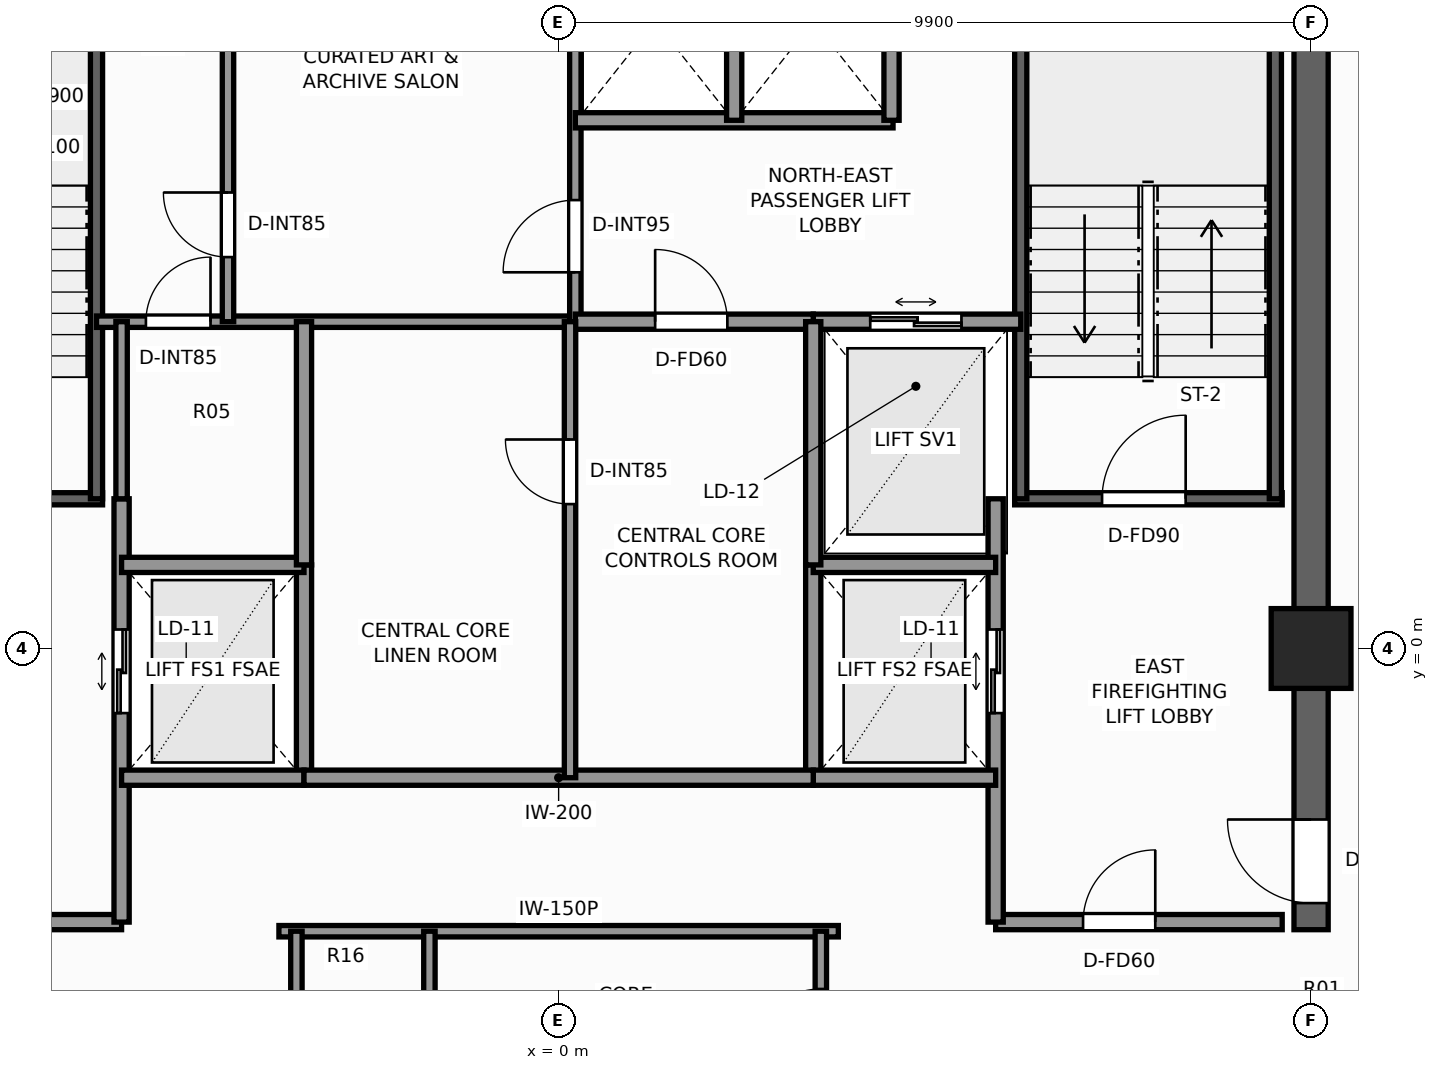
"""IFC4 building model, lengths in metres.
Left out: names, types, materials, properties, quantities, classifications, styles, units other than length and angle.
Written with IfcOpenShell. Run it as: python <this file> out.ifc"""

import sys

from ifc_helpers import new_model, si_unit, direction, frame, frame_2d, origin, origin_2d, place, context, subcontext, project, spatial, rectangle, extrude, element, fill, save


model = new_model("IFC4")
c1 = context("Model", 3, precision=1e-05, world=origin(), true_north=direction((0.0, 1.0)))
c2 = subcontext(c1, "Body", "Model", "MODEL_VIEW")
j1 = project(units=[si_unit("LENGTHUNIT", "METRE"), si_unit("PLANEANGLEUNIT", "RADIAN")], contexts=[c1])
p1 = place(None, origin())
s1 = spatial("IfcSite", under=j1, at=p1, CompositionType="ELEMENT")
p2 = place(p1, origin())
s2 = spatial("IfcBuilding", under=s1, at=p2, CompositionType="ELEMENT")
p3 = place(p2, frame((0.0, 0.0, 244.4)))
s3 = spatial("IfcBuildingStorey", under=s2, at=p3, CompositionType="ELEMENT", Elevation=244.4)
p4 = place(p3, frame((9.9, -3.7, 0.0), z_axis=(0.0, 0.0, 1.0), x_axis=(0.0, 1.0, 0.0)))
e1 = element("IfcWall", 1, at=p4, inside=s3, PredefinedType="SHEAR", context=c2, shape_type="SweptSolid", body=[
    extrude(rectangle(XDim=13.375, YDim=0.45, at=frame_2d((6.688, 0.0))), origin(), (0.0, 0.0, 1.0), 3.5),
])
p5 = place(p4, frame((0.35, 0.0, 0.0)))
e2 = element("IfcOpeningElement", 2, at=p5, cuts=e1, PredefinedType="OPENING", context=c2, shape_type="SweptSolid", body=[
    extrude(rectangle(XDim=1.1, YDim=2.2, at=frame_2d((0.55, 1.1))), frame((0.0, 0.235, 0.0), z_axis=(0.0, -1.0, 0.0), x_axis=(1.0, 0.0, 0.0)), (0.0, 0.0, 1.0), 0.47),
])
p6 = place(p3, frame((9.9, 0.0, 0.0), z_axis=(0.0, 0.0, 1.0), x_axis=(1.0, 0.0, 0.0)))
e3 = element("IfcColumn", 3, at=p6, inside=s3, PredefinedType="COLUMN", context=c2, shape_type="SweptSolid", body=[
    extrude(rectangle(XDim=1.05, YDim=1.05, at=origin_2d()), origin(), (0.0, 0.0, 1.0), 3.5),
])
p7 = place(p3, frame((-9.52, 1.97, 0.0), z_axis=(0.0, 0.0, 1.0), x_axis=(1.0, 0.0, 0.0)))
e4 = element("IfcWall", 4, at=p7, inside=s3, PredefinedType="SHEAR", context=c2, shape_type="SweptSolid", body=[
    extrude(rectangle(XDim=3.52, YDim=0.16, at=frame_2d((1.76, 0.0))), origin(), (0.0, 0.0, 1.0), 3.5),
])
p8 = place(p7, frame((1.15, 0.0, 0.0)))
e5 = element("IfcOpeningElement", 5, at=p8, cuts=e4, PredefinedType="OPENING", context=c2, shape_type="SweptSolid", body=[
    extrude(rectangle(XDim=1.1, YDim=2.2, at=frame_2d((0.55, 1.1))), frame((0.0, 0.09, 0.0), z_axis=(0.0, -1.0, 0.0), x_axis=(1.0, 0.0, 0.0)), (0.0, 0.0, 1.0), 0.18),
])
p9 = place(p3, frame((-6.08, 1.97, 0.0), z_axis=(0.0, 0.0, 1.0), x_axis=(0.0, 1.0, 0.0)))
e6 = element("IfcWall", 6, at=p9, inside=s3, PredefinedType="SHEAR", context=c2, shape_type="SweptSolid", body=[
    extrude(rectangle(XDim=7.56, YDim=0.16, at=frame_2d((3.78, 0.0))), origin(), (0.0, 0.0, 1.0), 3.5),
])
p10 = place(p3, frame((6.0, 1.97, 0.0), z_axis=(0.0, 0.0, 1.0), x_axis=(1.0, 0.0, 0.0)))
e7 = element("IfcWall", 7, at=p10, inside=s3, PredefinedType="SHEAR", context=c2, shape_type="SweptSolid", body=[
    extrude(rectangle(XDim=3.52, YDim=0.16, at=frame_2d((1.76, 0.0))), origin(), (0.0, 0.0, 1.0), 3.5),
])
p11 = place(p10, frame((1.15, 0.0, 0.0)))
e8 = element("IfcOpeningElement", 8, at=p11, cuts=e7, PredefinedType="OPENING", context=c2, shape_type="SweptSolid", body=[
    extrude(rectangle(XDim=1.1, YDim=2.2, at=frame_2d((0.55, 1.1))), frame((0.0, 0.09, 0.0), z_axis=(0.0, -1.0, 0.0), x_axis=(1.0, 0.0, 0.0)), (0.0, 0.0, 1.0), 0.18),
])
for number, where, z_axis, x_axis in (
    (9, (6.08, 1.97, 0.0), (0.0, 0.0, 1.0), (0.0, 1.0, 0.0)),
    (10, (9.43, 1.97, 0.0), (0.0, 0.0, 1.0), (0.0, 1.0, 0.0)),
):
    element("IfcWall", number, at=place(p3, frame(where, z_axis=z_axis, x_axis=x_axis)), inside=s3, PredefinedType="SHEAR", context=c2, shape_type="SweptSolid", body=[
        extrude(rectangle(XDim=7.56, YDim=0.16, at=frame_2d((3.78, 0.0))), origin(), (0.0, 0.0, 1.0), 3.5),
    ])
p12 = place(p3, frame((-9.52, -3.6, 0.0), z_axis=(0.0, 0.0, 1.0), x_axis=(1.0, 0.0, 0.0)))
e11 = element("IfcWall", 11, at=p12, inside=s3, PredefinedType="SOLIDWALL", context=c2, shape_type="SweptSolid", body=[
    extrude(rectangle(XDim=3.77, YDim=0.2, at=frame_2d((1.885, 0.0))), origin(), (0.0, 0.0, 1.0), 3.25),
])
p13 = place(p12, frame((1.15, 0.0, 0.0)))
e12 = element("IfcOpeningElement", 12, at=p13, cuts=e11, PredefinedType="OPENING", context=c2, shape_type="SweptSolid", body=[
    extrude(rectangle(XDim=0.95, YDim=2.06, at=frame_2d((0.475, 1.03))), frame((0.0, 0.11, 0.0), z_axis=(0.0, -1.0, 0.0), x_axis=(1.0, 0.0, 0.0)), (0.0, 0.0, 1.0), 0.22),
])
p14 = place(p3, frame((-5.75, -3.6, 0.0), z_axis=(0.0, 0.0, 1.0), x_axis=(0.0, 1.0, 0.0)))
e13 = element("IfcWall", 13, at=p14, inside=s3, PredefinedType="SOLIDWALL", context=c2, shape_type="SweptSolid", body=[
    extrude(rectangle(XDim=5.57, YDim=0.2, at=frame_2d((2.785, 0.0))), origin(), (0.0, 0.0, 1.0), 3.25),
])
p15 = place(p14, frame((2.75, 0.0, 0.0)))
e14 = element("IfcOpeningElement", 14, at=p15, cuts=e13, PredefinedType="OPENING", context=c2, shape_type="SweptSolid", body=[
    extrude(rectangle(XDim=1.1, YDim=2.2, at=frame_2d((0.55, 1.1))), frame((0.0, 0.11, 0.0), z_axis=(0.0, -1.0, 0.0), x_axis=(1.0, 0.0, 0.0)), (0.0, 0.0, 1.0), 0.22),
])
p16 = place(p3, frame((-3.35, -1.7, 0.0), z_axis=(0.0, 0.0, 1.0), x_axis=(0.0, 1.0, 0.0)))
e15 = element("IfcWall", 15, at=p16, inside=s3, PredefinedType="SOLIDWALL", context=c2, shape_type="SweptSolid", body=[
    extrude(rectangle(XDim=2.8, YDim=0.2, at=frame_2d((1.4, 0.0))), origin(), (0.0, 0.0, 1.0), 3.25),
])
for number, where, z_axis, x_axis in (
    (16, (-5.75, -1.7, 0.0), (0.0, 0.0, 1.0), (1.0, 0.0, 0.0)),
    (17, (-5.75, 1.1, 0.0), (0.0, 0.0, 1.0), (1.0, 0.0, 0.0)),
):
    element("IfcWall", number, at=place(p3, frame(where, z_axis=z_axis, x_axis=x_axis)), inside=s3, PredefinedType="SOLIDWALL", context=c2, shape_type="SweptSolid", body=[
        extrude(rectangle(XDim=2.4, YDim=0.2, at=frame_2d((1.2, 0.0))), origin(), (0.0, 0.0, 1.0), 3.25),
    ])
p17 = place(p3, frame((5.75, -3.6, 0.0), z_axis=(0.0, 0.0, 1.0), x_axis=(1.0, 0.0, 0.0)))
e18 = element("IfcWall", 18, at=p17, inside=s3, PredefinedType="SOLIDWALL", context=c2, shape_type="SweptSolid", body=[
    extrude(rectangle(XDim=3.77, YDim=0.2, at=frame_2d((1.885, 0.0))), origin(), (0.0, 0.0, 1.0), 3.25),
])
p18 = place(p17, frame((1.15, 0.0, 0.0)))
e19 = element("IfcOpeningElement", 19, at=p18, cuts=e18, PredefinedType="OPENING", context=c2, shape_type="SweptSolid", body=[
    extrude(rectangle(XDim=0.95, YDim=2.06, at=frame_2d((0.475, 1.03))), frame((0.0, 0.11, 0.0), z_axis=(0.0, -1.0, 0.0), x_axis=(1.0, 0.0, 0.0)), (0.0, 0.0, 1.0), 0.22),
])
p19 = place(p3, frame((5.75, -3.6, 0.0), z_axis=(0.0, 0.0, 1.0), x_axis=(0.0, 1.0, 0.0)))
e20 = element("IfcWall", 20, at=p19, inside=s3, PredefinedType="SOLIDWALL", context=c2, shape_type="SweptSolid", body=[
    extrude(rectangle(XDim=5.57, YDim=0.2, at=frame_2d((2.785, 0.0))), origin(), (0.0, 0.0, 1.0), 3.25),
])
p20 = place(p19, frame((2.75, 0.0, 0.0)))
e21 = element("IfcOpeningElement", 21, at=p20, cuts=e20, PredefinedType="OPENING", context=c2, shape_type="SweptSolid", body=[
    extrude(rectangle(XDim=1.1, YDim=2.2, at=frame_2d((0.55, 1.1))), frame((0.0, 0.11, 0.0), z_axis=(0.0, -1.0, 0.0), x_axis=(1.0, 0.0, 0.0)), (0.0, 0.0, 1.0), 0.22),
])
p21 = place(p3, frame((3.35, -1.7, 0.0), z_axis=(0.0, 0.0, 1.0), x_axis=(0.0, 1.0, 0.0)))
e22 = element("IfcWall", 22, at=p21, inside=s3, PredefinedType="SOLIDWALL", context=c2, shape_type="SweptSolid", body=[
    extrude(rectangle(XDim=2.8, YDim=0.2, at=frame_2d((1.4, 0.0))), origin(), (0.0, 0.0, 1.0), 3.25),
])
for number, where, z_axis, x_axis in (
    (23, (3.35, -1.7, 0.0), (0.0, 0.0, 1.0), (1.0, 0.0, 0.0)),
    (24, (3.35, 1.1, 0.0), (0.0, 0.0, 1.0), (1.0, 0.0, 0.0)),
):
    element("IfcWall", number, at=place(p3, frame(where, z_axis=z_axis, x_axis=x_axis)), inside=s3, PredefinedType="SOLIDWALL", context=c2, shape_type="SweptSolid", body=[
        extrude(rectangle(XDim=2.4, YDim=0.2, at=frame_2d((1.2, 0.0))), origin(), (0.0, 0.0, 1.0), 3.25),
    ])
p22 = place(p3, frame((3.35, 4.3, 0.0), z_axis=(0.0, 0.0, 1.0), x_axis=(1.0, 0.0, 0.0)))
e25 = element("IfcWall", 25, at=p22, inside=s3, PredefinedType="SOLIDWALL", context=c2, shape_type="SweptSolid", body=[
    extrude(rectangle(XDim=2.73, YDim=0.2, at=frame_2d((1.365, 0.0))), origin(), (0.0, 0.0, 1.0), 3.25),
])
p23 = place(p22, frame((0.75, 0.0, 0.0)))
e26 = element("IfcOpeningElement", 26, at=p23, cuts=e25, PredefinedType="OPENING", context=c2, shape_type="SweptSolid", body=[
    extrude(rectangle(XDim=1.2, YDim=2.25, at=frame_2d((0.6, 1.125))), frame((0.0, 0.11, 0.0), z_axis=(0.0, -1.0, 0.0), x_axis=(1.0, 0.0, 0.0)), (0.0, 0.0, 1.0), 0.22),
])
p24 = place(p3, frame((-6.08, 4.3, 0.0), z_axis=(0.0, 0.0, 1.0), x_axis=(1.0, 0.0, 0.0)))
e27 = element("IfcWall", 27, at=p24, inside=s3, PredefinedType="PARTITIONING", context=c2, shape_type="SweptSolid", body=[
    extrude(rectangle(XDim=6.3, YDim=0.15, at=frame_2d((3.15, 0.0))), origin(), (0.0, 0.0, 1.0), 3.25),
])
p25 = place(p24, frame((0.65, 0.0, 0.0)))
e28 = element("IfcOpeningElement", 28, at=p25, cuts=e27, PredefinedType="OPENING", context=c2, shape_type="SweptSolid", body=[
    extrude(rectangle(XDim=0.85, YDim=2.03, at=frame_2d((0.425, 1.015))), frame((0.0, 0.085, 0.0), z_axis=(0.0, -1.0, 0.0), x_axis=(1.0, 0.0, 0.0)), (0.0, 0.0, 1.0), 0.17),
])
p26 = place(p3, frame((0.22, 4.3, 0.0), z_axis=(0.0, 0.0, 1.0), x_axis=(0.0, 1.0, 0.0)))
e29 = element("IfcWall", 29, at=p26, inside=s3, PredefinedType="PARTITIONING", context=c2, shape_type="SweptSolid", body=[
    extrude(rectangle(XDim=5.22, YDim=0.15, at=frame_2d((2.61, 0.0))), origin(), (0.0, 0.0, 1.0), 3.25),
])
p27 = place(p26, frame((0.65, 0.0, 0.0)))
e30 = element("IfcOpeningElement", 30, at=p27, cuts=e29, PredefinedType="OPENING", context=c2, shape_type="SweptSolid", body=[
    extrude(rectangle(XDim=0.95, YDim=2.06, at=frame_2d((0.475, 1.03))), frame((0.0, 0.085, 0.0), z_axis=(0.0, -1.0, 0.0), x_axis=(1.0, 0.0, 0.0)), (0.0, 0.0, 1.0), 0.17),
])
p28 = place(p3, frame((-4.35, 4.3, 0.0), z_axis=(0.0, 0.0, 1.0), x_axis=(0.0, 1.0, 0.0)))
e31 = element("IfcWall", 31, at=p28, inside=s3, PredefinedType="PARTITIONING", context=c2, shape_type="SweptSolid", body=[
    extrude(rectangle(XDim=5.22, YDim=0.15, at=frame_2d((2.61, 0.0))), origin(), (0.0, 0.0, 1.0), 3.25),
])
p29 = place(p28, frame((0.85, 0.0, 0.0)))
e32 = element("IfcOpeningElement", 32, at=p29, cuts=e31, PredefinedType="OPENING", context=c2, shape_type="SweptSolid", body=[
    extrude(rectangle(XDim=0.85, YDim=2.03, at=frame_2d((0.425, 1.015))), frame((0.0, 0.085, 0.0), z_axis=(0.0, -1.0, 0.0), x_axis=(1.0, 0.0, 0.0)), (0.0, 0.0, 1.0), 0.17),
])
p30 = place(p3, frame((0.22, 6.95, 0.0), z_axis=(0.0, 0.0, 1.0), x_axis=(1.0, 0.0, 0.0)))
e33 = element("IfcWall", 33, at=p30, inside=s3, PredefinedType="SOLIDWALL", context=c2, shape_type="SweptSolid", body=[
    extrude(rectangle(XDim=4.18, YDim=0.2, at=frame_2d((2.09, 0.0))), origin(), (0.0, 0.0, 1.0), 3.25),
])
for number, where, z_axis, x_axis in (
    (34, (4.38, 6.95, 0.0), (0.0, 0.0, 1.0), (0.0, 1.0, 0.0)),
    (35, (2.31, 6.95, 0.0), (0.0, 0.0, 1.0), (0.0, 1.0, 0.0)),
):
    element("IfcWall", number, at=place(p3, frame(where, z_axis=z_axis, x_axis=x_axis)), inside=s3, PredefinedType="SOLIDWALL", context=c2, shape_type="SweptSolid", body=[
        extrude(rectangle(XDim=2.57, YDim=0.2, at=frame_2d((1.285, 0.0))), origin(), (0.0, 0.0, 1.0), 3.25),
    ])
p31 = place(p3, frame((0.22, 4.3, 0.0), z_axis=(0.0, 0.0, 1.0), x_axis=(1.0, 0.0, 0.0)))
e36 = element("IfcWall", 36, at=p31, inside=s3, PredefinedType="SOLIDWALL", context=c2, shape_type="SweptSolid", body=[
    extrude(rectangle(XDim=3.13, YDim=0.2, at=frame_2d((1.565, 0.0))), origin(), (0.0, 0.0, 1.0), 3.25),
])
p32 = place(p31, frame((1.05, 0.0, 0.0)))
e37 = element("IfcOpeningElement", 37, at=p32, cuts=e36, PredefinedType="OPENING", context=c2, shape_type="SweptSolid", body=[
    extrude(rectangle(XDim=0.95, YDim=2.06, at=frame_2d((0.475, 1.03))), frame((0.0, 0.11, 0.0), z_axis=(0.0, -1.0, 0.0), x_axis=(1.0, 0.0, 0.0)), (0.0, 0.0, 1.0), 0.22),
])
p33 = place(p3, frame((-3.35, -1.7, 0.0), z_axis=(0.0, 0.0, 1.0), x_axis=(1.0, 0.0, 0.0)))
e38 = element("IfcWall", 38, at=p33, inside=s3, PredefinedType="SOLIDWALL", context=c2, shape_type="SweptSolid", body=[
    extrude(rectangle(XDim=6.7, YDim=0.2, at=frame_2d((3.35, 0.0))), origin(), (0.0, 0.0, 1.0), 3.25),
])
for number, where, z_axis, x_axis in (
    (39, (-3.35, 1.1, 0.0), (0.0, 0.0, 1.0), (0.0, 1.0, 0.0)),
    (40, (3.35, 1.1, 0.0), (0.0, 0.0, 1.0), (0.0, 1.0, 0.0)),
):
    element("IfcWall", number, at=place(p3, frame(where, z_axis=z_axis, x_axis=x_axis)), inside=s3, PredefinedType="SOLIDWALL", context=c2, shape_type="SweptSolid", body=[
        extrude(rectangle(XDim=3.2, YDim=0.2, at=frame_2d((1.6, 0.0))), origin(), (0.0, 0.0, 1.0), 3.25),
    ])
p34 = place(p3, frame((0.15, -1.7, 0.0), z_axis=(0.0, 0.0, 1.0), x_axis=(0.0, 1.0, 0.0)))
e41 = element("IfcWall", 41, at=p34, inside=s3, PredefinedType="PARTITIONING", context=c2, shape_type="SweptSolid", body=[
    extrude(rectangle(XDim=6.0, YDim=0.15, at=frame_2d((3.0, 0.0))), origin(), (0.0, 0.0, 1.0), 3.25),
])
p35 = place(p34, frame((3.6, 0.0, 0.0)))
e42 = element("IfcOpeningElement", 42, at=p35, cuts=e41, PredefinedType="OPENING", context=c2, shape_type="SweptSolid", body=[
    extrude(rectangle(XDim=0.85, YDim=2.03, at=frame_2d((0.425, 1.015))), frame((0.0, 0.085, 0.0), z_axis=(0.0, -1.0, 0.0), x_axis=(1.0, 0.0, 0.0)), (0.0, 0.0, 1.0), 0.17),
])
p36 = place(p3, frame((-3.68, -3.72, 0.0), z_axis=(0.0, 0.0, 1.0), x_axis=(1.0, 0.0, 0.0)))
e43 = element("IfcWall", 43, at=p36, inside=s3, PredefinedType="PARTITIONING", context=c2, shape_type="SweptSolid", body=[
    extrude(rectangle(XDim=7.36, YDim=0.15, at=frame_2d((3.68, 0.0))), origin(), (0.0, 0.0, 1.0), 3.25),
])
p37 = place(p3, frame((3.45, -6.08, 0.0), z_axis=(0.0, 0.0, 1.0), x_axis=(0.0, 1.0, 0.0)))
e44 = element("IfcWall", 44, at=p37, inside=s3, PredefinedType="PARTITIONING", context=c2, shape_type="SweptSolid", body=[
    extrude(rectangle(XDim=2.36, YDim=0.15, at=frame_2d((1.18, 0.0))), origin(), (0.0, 0.0, 1.0), 3.25),
])
p38 = place(p37, frame((0.65, 0.0, 0.0)))
e45 = element("IfcOpeningElement", 45, at=p38, cuts=e44, PredefinedType="OPENING", context=c2, shape_type="SweptSolid", body=[
    extrude(rectangle(XDim=0.95, YDim=2.06, at=frame_2d((0.475, 1.03))), frame((0.0, 0.085, 0.0), z_axis=(0.0, -1.0, 0.0), x_axis=(1.0, 0.0, 0.0)), (0.0, 0.0, 1.0), 0.17),
])
p39 = place(p3, frame((-3.45, -6.08, 0.0), z_axis=(0.0, 0.0, 1.0), x_axis=(0.0, 1.0, 0.0)))
e46 = element("IfcWall", 46, at=p39, inside=s3, PredefinedType="PARTITIONING", context=c2, shape_type="SweptSolid", body=[
    extrude(rectangle(XDim=2.36, YDim=0.15, at=frame_2d((1.18, 0.0))), origin(), (0.0, 0.0, 1.0), 3.25),
])
p40 = place(p3, frame((-1.7, -6.08, 0.0), z_axis=(0.0, 0.0, 1.0), x_axis=(0.0, 1.0, 0.0)))
e47 = element("IfcWall", 47, at=p40, inside=s3, PredefinedType="PARTITIONING", context=c2, shape_type="SweptSolid", body=[
    extrude(rectangle(XDim=2.36, YDim=0.15, at=frame_2d((1.18, 0.0))), origin(), (0.0, 0.0, 1.0), 3.25),
])
p41 = place(p40, frame((0.65, 0.0, 0.0)))
e48 = element("IfcOpeningElement", 48, at=p41, cuts=e47, PredefinedType="OPENING", context=c2, shape_type="SweptSolid", body=[
    extrude(rectangle(XDim=0.9, YDim=2.06, at=frame_2d((0.45, 1.03))), frame((0.0, 0.085, 0.0), z_axis=(0.0, -1.0, 0.0), x_axis=(1.0, 0.0, 0.0)), (0.0, 0.0, 1.0), 0.17),
])
p42 = place(p3, frame((-5.75, 1.97, 0.0), z_axis=(0.0, 0.0, 1.0), x_axis=(0.0, 1.0, 0.0)))
e49 = element("IfcWall", 49, at=p42, inside=s3, PredefinedType="PARTITIONING", context=c2, shape_type="SweptSolid", body=[
    extrude(rectangle(XDim=2.33, YDim=0.15, at=frame_2d((1.165, 0.0))), origin(), (0.0, 0.0, 1.0), 3.25),
])
p43 = place(p11, origin())
e50 = element("IfcDoor", 50, at=p43, inside=s3, OperationType="SINGLE_SWING_RIGHT", PredefinedType="DOOR", context=c2, shape_type="SweptSolid", body=[
    extrude(rectangle(XDim=1.1, YDim=2.2, at=frame_2d((0.55, 1.1))), frame((0.0, 0.025, 0.0), z_axis=(0.0, -1.0, 0.0), x_axis=(1.0, 0.0, 0.0)), (0.0, 0.0, 1.0), 0.05),
])
fill(e8, e50)
p44 = place(p15, origin())
e51 = element("IfcDoor", 51, at=p44, inside=s3, OperationType="DOUBLE_DOOR_SLIDING", PredefinedType="DOOR", context=c2, shape_type="SweptSolid", body=[
    extrude(rectangle(XDim=1.1, YDim=2.2, at=frame_2d((0.55, 1.1))), frame((0.0, 0.025, 0.0), z_axis=(0.0, -1.0, 0.0), x_axis=(1.0, 0.0, 0.0)), (0.0, 0.0, 1.0), 0.05),
])
fill(e14, e51)
p45 = place(p5, origin())
e52 = element("IfcDoor", 52, at=p45, inside=s3, OperationType="SINGLE_SWING_RIGHT", PredefinedType="DOOR", context=c2, shape_type="SweptSolid", body=[
    extrude(rectangle(XDim=1.1, YDim=2.2, at=frame_2d((0.55, 1.1))), frame((0.0, 0.025, 0.0), z_axis=(0.0, -1.0, 0.0), x_axis=(1.0, 0.0, 0.0)), (0.0, 0.0, 1.0), 0.05),
])
fill(e2, e52)
p46 = place(p20, origin())
e53 = element("IfcDoor", 53, at=p46, inside=s3, OperationType="DOUBLE_DOOR_SLIDING", PredefinedType="DOOR", context=c2, shape_type="SweptSolid", body=[
    extrude(rectangle(XDim=1.1, YDim=2.2, at=frame_2d((0.55, 1.1))), frame((0.0, 0.025, 0.0), z_axis=(0.0, -1.0, 0.0), x_axis=(1.0, 0.0, 0.0)), (0.0, 0.0, 1.0), 0.05),
])
fill(e21, e53)
p47 = place(p23, origin())
e54 = element("IfcDoor", 54, at=p47, inside=s3, OperationType="DOUBLE_DOOR_SLIDING", PredefinedType="DOOR", context=c2, shape_type="SweptSolid", body=[
    extrude(rectangle(XDim=1.2, YDim=2.25, at=frame_2d((0.6, 1.125))), frame((0.0, 0.025, 0.0), z_axis=(0.0, -1.0, 0.0), x_axis=(1.0, 0.0, 0.0)), (0.0, 0.0, 1.0), 0.05),
])
fill(e26, e54)
p48 = place(p27, origin())
e55 = element("IfcDoor", 55, at=p48, inside=s3, OperationType="SINGLE_SWING_LEFT", PredefinedType="DOOR", context=c2, shape_type="SweptSolid", body=[
    extrude(rectangle(XDim=0.95, YDim=2.06, at=frame_2d((0.475, 1.03))), frame((0.0, 0.025, 0.0), z_axis=(0.0, -1.0, 0.0), x_axis=(1.0, 0.0, 0.0)), (0.0, 0.0, 1.0), 0.05),
])
fill(e30, e55)
p49 = place(p29, origin())
e56 = element("IfcDoor", 56, at=p49, inside=s3, OperationType="SINGLE_SWING_RIGHT", PredefinedType="DOOR", context=c2, shape_type="SweptSolid", body=[
    extrude(rectangle(XDim=0.85, YDim=2.03, at=frame_2d((0.425, 1.015))), frame((0.0, 0.025, 0.0), z_axis=(0.0, -1.0, 0.0), x_axis=(1.0, 0.0, 0.0)), (0.0, 0.0, 1.0), 0.05),
])
fill(e32, e56)
p50 = place(p18, origin())
e57 = element("IfcDoor", 57, at=p50, inside=s3, OperationType="SINGLE_SWING_RIGHT", PredefinedType="DOOR", context=c2, shape_type="SweptSolid", body=[
    extrude(rectangle(XDim=0.95, YDim=2.06, at=frame_2d((0.475, 1.03))), frame((0.0, 0.025, 0.0), z_axis=(0.0, -1.0, 0.0), x_axis=(1.0, 0.0, 0.0)), (0.0, 0.0, 1.0), 0.05),
])
fill(e19, e57)
p51 = place(p32, origin())
e58 = element("IfcDoor", 58, at=p51, inside=s3, OperationType="SINGLE_SWING_LEFT", PredefinedType="DOOR", context=c2, shape_type="SweptSolid", body=[
    extrude(rectangle(XDim=0.95, YDim=2.06, at=frame_2d((0.475, 1.03))), frame((0.0, 0.025, 0.0), z_axis=(0.0, -1.0, 0.0), x_axis=(1.0, 0.0, 0.0)), (0.0, 0.0, 1.0), 0.05),
])
fill(e37, e58)
p52 = place(p35, origin())
e59 = element("IfcDoor", 59, at=p52, inside=s3, OperationType="SINGLE_SWING_RIGHT", PredefinedType="DOOR", context=c2, shape_type="SweptSolid", body=[
    extrude(rectangle(XDim=0.85, YDim=2.03, at=frame_2d((0.425, 1.015))), frame((0.0, 0.025, 0.0), z_axis=(0.0, -1.0, 0.0), x_axis=(1.0, 0.0, 0.0)), (0.0, 0.0, 1.0), 0.05),
])
fill(e42, e59)
p53 = place(p38, origin())
e60 = element("IfcDoor", 60, at=p53, inside=s3, OperationType="SINGLE_SWING_LEFT", PredefinedType="DOOR", context=c2, shape_type="SweptSolid", body=[
    extrude(rectangle(XDim=0.95, YDim=2.06, at=frame_2d((0.475, 1.03))), frame((0.0, 0.025, 0.0), z_axis=(0.0, -1.0, 0.0), x_axis=(1.0, 0.0, 0.0)), (0.0, 0.0, 1.0), 0.05),
])
fill(e45, e60)
p54 = place(p25, origin())
e61 = element("IfcDoor", 61, at=p54, inside=s3, OperationType="SINGLE_SWING_RIGHT", PredefinedType="DOOR", context=c2, shape_type="SweptSolid", body=[
    extrude(rectangle(XDim=0.85, YDim=2.03, at=frame_2d((0.425, 1.015))), frame((0.0, 0.025, 0.0), z_axis=(0.0, -1.0, 0.0), x_axis=(1.0, 0.0, 0.0)), (0.0, 0.0, 1.0), 0.05),
])
fill(e28, e61)
save(model, sys.argv[1])
